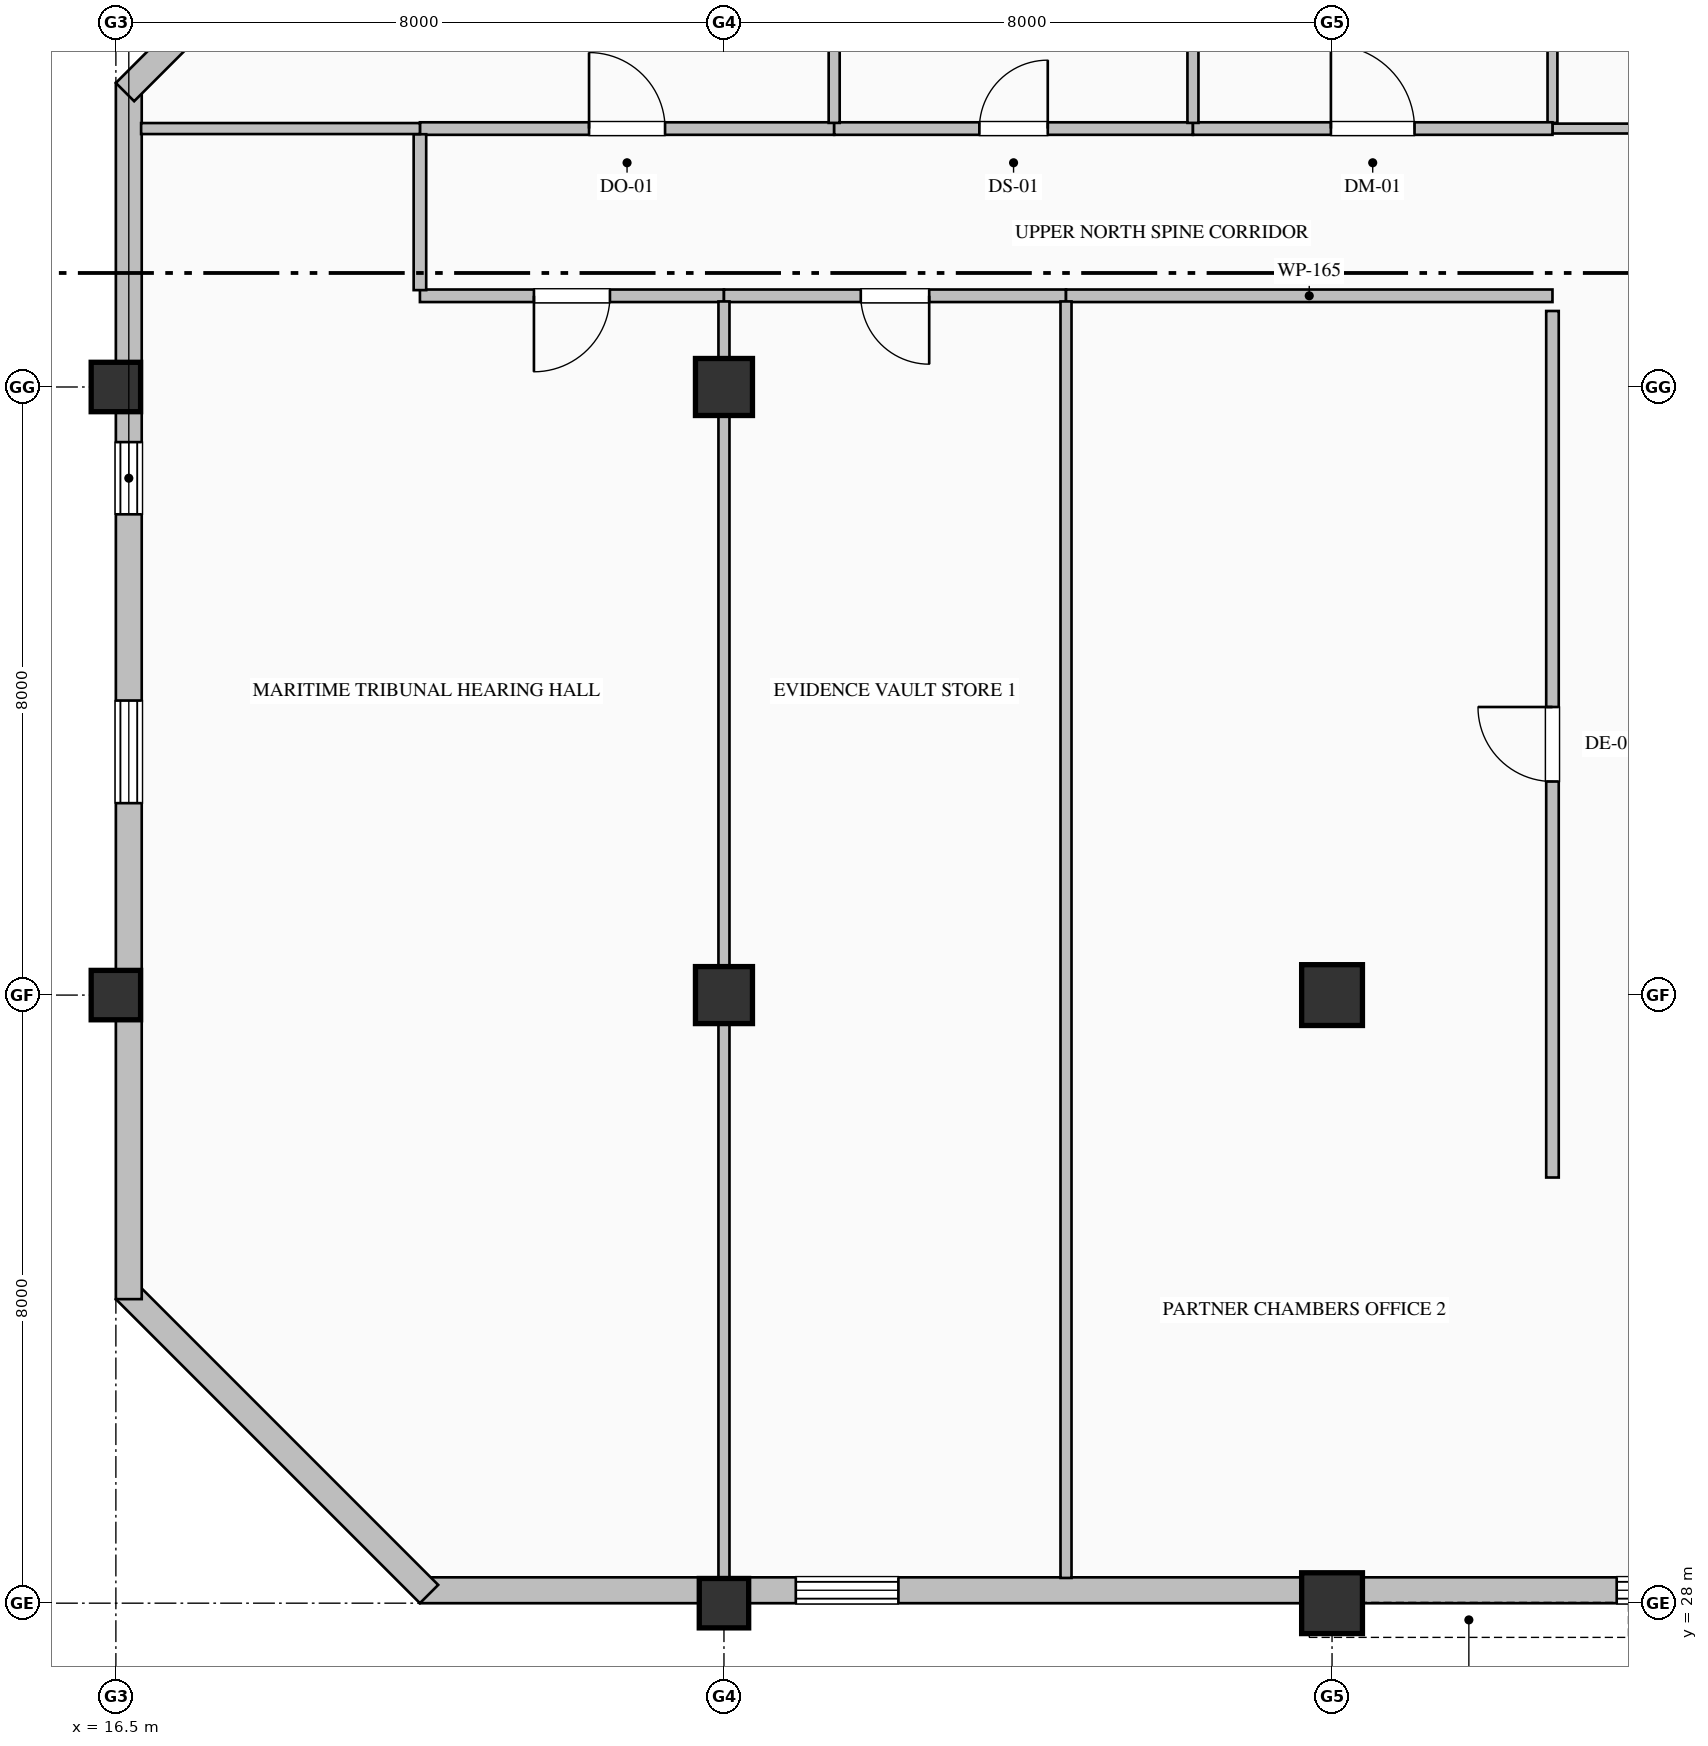
"""IFC4 building model, lengths in metres.
Left out: names, types, materials, properties, quantities, classifications, styles, units other than length and angle.
Written with IfcOpenShell. Run it as: python <this file> out.ifc"""

import sys

from ifc_helpers import new_model, si_unit, direction, frame, frame_2d, origin, origin_2d, place, context, subcontext, project, spatial, rectangle, hollow_rectangle, extrude, element, fill, save


model = new_model("IFC4")
c1 = context("Model", 3, precision=1e-05, world=origin(), true_north=direction((0.0, 1.0)))
c2 = subcontext(c1, "Body", "Model", "MODEL_VIEW")
j1 = project(units=[si_unit("LENGTHUNIT", "METRE"), si_unit("PLANEANGLEUNIT", "RADIAN")], contexts=[c1])
p1 = place(None, origin())
s1 = spatial("IfcSite", under=j1, at=p1, CompositionType="ELEMENT")
p2 = place(p1, origin())
s2 = spatial("IfcBuilding", under=s1, at=p2, CompositionType="ELEMENT")
p3 = place(p2, frame((0.0, 0.0, 363.2)))
s3 = spatial("IfcBuildingStorey", under=s2, at=p3, CompositionType="ELEMENT", Elevation=363.2)
for number, where, z_axis, x_axis in (
    (1, (16.5, 36.0, 0.0), (0.0, 0.0, 1.0), (1.0, 0.0, 0.0)),
    (2, (16.5, 44.0, 0.0), (0.0, 0.0, 1.0), (1.0, 0.0, 0.0)),
    (3, (24.5, 28.0, 0.0), (0.0, 0.0, 1.0), (1.0, 0.0, 0.0)),
):
    element("IfcColumn", number, at=place(p3, frame(where, z_axis=z_axis, x_axis=x_axis)), inside=s3, PredefinedType="COLUMN", context=c2, shape_type="SweptSolid", body=[
        extrude(hollow_rectangle(XDim=0.65, YDim=0.65, WallThickness=0.028, at=origin_2d()), origin(), (0.0, 0.0, 1.0), 4.0),
    ])
for number, where, z_axis, x_axis in (
    (4, (24.5, 36.0, 0.0), (0.0, 0.0, 1.0), (1.0, 0.0, 0.0)),
    (5, (24.5, 44.0, 0.0), (0.0, 0.0, 1.0), (1.0, 0.0, 0.0)),
):
    element("IfcColumn", number, at=place(p3, frame(where, z_axis=z_axis, x_axis=x_axis)), inside=s3, PredefinedType="COLUMN", context=c2, shape_type="SweptSolid", body=[
        extrude(rectangle(XDim=0.75, YDim=0.75, at=origin_2d()), origin(), (0.0, 0.0, 1.0), 4.0),
    ])
for number, where, z_axis, x_axis in (
    (6, (32.5, 28.0, 0.0), (0.0, 0.0, 1.0), (1.0, 0.0, 0.0)),
    (7, (32.5, 36.0, 0.0), (0.0, 0.0, 1.0), (1.0, 0.0, 0.0)),
):
    element("IfcColumn", number, at=place(p3, frame(where, z_axis=z_axis, x_axis=x_axis)), inside=s3, PredefinedType="COLUMN", context=c2, shape_type="SweptSolid", body=[
        extrude(hollow_rectangle(XDim=0.8, YDim=0.8, WallThickness=0.032, at=origin_2d()), origin(), (0.0, 0.0, 1.0), 4.0),
    ])
p4 = place(p3, frame((40.52, 28.17, 0.0), z_axis=(0.0, 0.0, 1.0), x_axis=(-1.0, 0.0, 0.0)))
e8 = element("IfcWall", 8, at=p4, inside=s3, PredefinedType="SOLIDWALL", context=c2, shape_type="SweptSolid", body=[
    extrude(rectangle(XDim=20.02, YDim=0.34, at=frame_2d((10.01, 0.0))), origin(), (0.0, 0.0, 1.0), 2.98),
])
p5 = place(p4, frame((2.925, 0.0, 0.9)))
e9 = element("IfcOpeningElement", 9, at=p5, cuts=e8, PredefinedType="OPENING", context=c2, shape_type="SweptSolid", body=[
    extrude(rectangle(XDim=1.35, YDim=1.85, at=frame_2d((0.675, 0.925))), frame((0.0, 0.18, 0.0), z_axis=(0.0, -1.0, 0.0), x_axis=(1.0, 0.0, 0.0)), (0.0, 0.0, 1.0), 0.36),
])
p6 = place(p4, frame((13.725, 0.0, 0.9)))
e10 = element("IfcOpeningElement", 10, at=p6, cuts=e8, PredefinedType="OPENING", context=c2, shape_type="SweptSolid", body=[
    extrude(rectangle(XDim=1.35, YDim=1.85, at=frame_2d((0.675, 0.925))), frame((0.0, 0.18, 0.0), z_axis=(0.0, -1.0, 0.0), x_axis=(1.0, 0.0, 0.0)), (0.0, 0.0, 1.0), 0.36),
])
p7 = place(p3, frame((20.62, 28.12, 0.0), z_axis=(0.0, 0.0, 1.0), x_axis=(-0.707106781187, 0.707106781187, 0.0)))
e11 = element("IfcWall", 11, at=p7, inside=s3, PredefinedType="SOLIDWALL", context=c2, shape_type="SweptSolid", body=[
    extrude(rectangle(XDim=5.657, YDim=0.34, at=frame_2d((2.828, 0.0))), origin(), (0.0, 0.0, 1.0), 3.58),
])
p8 = place(p3, frame((16.67, 32.0, 0.0), z_axis=(0.0, 0.0, 1.0), x_axis=(0.0, 1.0, 0.0)))
e12 = element("IfcWall", 12, at=p8, inside=s3, PredefinedType="SOLIDWALL", context=c2, shape_type="SweptSolid", body=[
    extrude(rectangle(XDim=16.0, YDim=0.34, at=frame_2d((8.0, 0.0))), origin(), (0.0, 0.0, 1.0), 3.13),
])
p9 = place(p8, frame((6.525, 0.0, 0.9)))
e13 = element("IfcOpeningElement", 13, at=p9, cuts=e12, PredefinedType="OPENING", context=c2, shape_type="SweptSolid", body=[
    extrude(rectangle(XDim=1.35, YDim=1.85, at=frame_2d((0.675, 0.925))), frame((0.0, 0.18, 0.0), z_axis=(0.0, -1.0, 0.0), x_axis=(1.0, 0.0, 0.0)), (0.0, 0.0, 1.0), 0.36),
])
p10 = place(p8, frame((10.325, 0.0, 0.9)))
e14 = element("IfcOpeningElement", 14, at=p10, cuts=e12, PredefinedType="OPENING", context=c2, shape_type="SweptSolid", body=[
    extrude(rectangle(XDim=0.95, YDim=1.85, at=frame_2d((0.475, 0.925))), frame((0.0, 0.18, 0.0), z_axis=(0.0, -1.0, 0.0), x_axis=(1.0, 0.0, 0.0)), (0.0, 0.0, 1.0), 0.36),
])
p11 = place(p3, frame((16.62, 47.88, 0.0), z_axis=(0.0, 0.0, 1.0), x_axis=(0.707106781187, 0.707106781187, 0.0)))
e15 = element("IfcWall", 15, at=p11, inside=s3, PredefinedType="SOLIDWALL", context=c2, shape_type="SweptSolid", body=[
    extrude(rectangle(XDim=5.657, YDim=0.34, at=frame_2d((2.828, 0.0))), origin(), (0.0, 0.0, 1.0), 3.58),
])
p12 = place(p3, frame((37.8, 47.4, 0.0), z_axis=(0.0, 0.0, 1.0), x_axis=(-1.0, 0.0, 0.0)))
e16 = element("IfcWall", 16, at=p12, inside=s3, PredefinedType="PARTITIONING", context=c2, shape_type="SweptSolid", body=[
    extrude(rectangle(XDim=2.4, YDim=0.13, at=frame_2d((1.2, 0.0))), origin(), (0.0, 0.0, 1.0), 3.58),
])
p13 = place(p3, frame((35.4, 47.475, 0.0), z_axis=(0.0, 0.0, 1.0), x_axis=(0.0, 1.0, 0.0)))
e17 = element("IfcWall", 17, at=p13, inside=s3, PredefinedType="PARTITIONING", context=c2, shape_type="SweptSolid", body=[
    extrude(rectangle(XDim=4.193, YDim=0.13, at=frame_2d((2.097, 0.0))), origin(), (0.0, 0.0, 1.0), 3.58),
])
p14 = place(p3, frame((20.5, 47.4, 0.0), z_axis=(0.0, 0.0, 1.0), x_axis=(1.0, 0.0, 0.0)))
e18 = element("IfcWall", 18, at=p14, inside=s3, PredefinedType="PARTITIONING", context=c2, shape_type="SweptSolid", body=[
    extrude(rectangle(XDim=5.45, YDim=0.165, at=frame_2d((2.725, 0.0))), origin(), (0.0, 0.0, 1.0), 3.58),
])
p15 = place(p14, frame((2.225, 0.0, 0.0)))
e19 = element("IfcOpeningElement", 19, at=p15, cuts=e18, PredefinedType="OPENING", context=c2, shape_type="SweptSolid", body=[
    extrude(rectangle(XDim=1.0, YDim=2.15, at=frame_2d((0.5, 1.075))), frame((0.0, 0.093, 0.0), z_axis=(0.0, -1.0, 0.0), x_axis=(1.0, 0.0, 0.0)), (0.0, 0.0, 1.0), 0.185),
])
p16 = place(p3, frame((25.95, 47.4, 0.0), z_axis=(0.0, 0.0, 1.0), x_axis=(1.0, 0.0, 0.0)))
e20 = element("IfcWall", 20, at=p16, inside=s3, PredefinedType="PARTITIONING", context=c2, shape_type="SweptSolid", body=[
    extrude(rectangle(XDim=4.72, YDim=0.165, at=frame_2d((2.36, 0.0))), origin(), (0.0, 0.0, 1.0), 3.58),
])
p17 = place(p16, frame((1.91, 0.0, 0.0)))
e21 = element("IfcOpeningElement", 21, at=p17, cuts=e20, PredefinedType="OPENING", context=c2, shape_type="SweptSolid", body=[
    extrude(rectangle(XDim=0.9, YDim=2.15, at=frame_2d((0.45, 1.075))), frame((0.0, 0.093, 0.0), z_axis=(0.0, -1.0, 0.0), x_axis=(1.0, 0.0, 0.0)), (0.0, 0.0, 1.0), 0.185),
])
p18 = place(p3, frame((30.67, 47.4, 0.0), z_axis=(0.0, 0.0, 1.0), x_axis=(1.0, 0.0, 0.0)))
e22 = element("IfcWall", 22, at=p18, inside=s3, PredefinedType="PARTITIONING", context=c2, shape_type="SweptSolid", body=[
    extrude(rectangle(XDim=4.73, YDim=0.165, at=frame_2d((2.365, 0.0))), origin(), (0.0, 0.0, 1.0), 3.58),
])
p19 = place(p18, frame((1.815, 0.0, 0.0)))
e23 = element("IfcOpeningElement", 23, at=p19, cuts=e22, PredefinedType="OPENING", context=c2, shape_type="SweptSolid", body=[
    extrude(rectangle(XDim=1.1, YDim=2.2, at=frame_2d((0.55, 1.1))), frame((0.0, 0.093, 0.0), z_axis=(0.0, -1.0, 0.0), x_axis=(1.0, 0.0, 0.0)), (0.0, 0.0, 1.0), 0.185),
])
p20 = place(p3, frame((24.5, 45.2, 0.0), z_axis=(0.0, 0.0, 1.0), x_axis=(-1.0, 0.0, 0.0)))
e24 = element("IfcWall", 24, at=p20, inside=s3, PredefinedType="PARTITIONING", context=c2, shape_type="SweptSolid", body=[
    extrude(rectangle(XDim=4.0, YDim=0.165, at=frame_2d((2.0, 0.0))), origin(), (0.0, 0.0, 1.0), 3.58),
])
p21 = place(p20, frame((1.5, 0.0, 0.0)))
e25 = element("IfcOpeningElement", 25, at=p21, cuts=e24, PredefinedType="OPENING", context=c2, shape_type="SweptSolid", body=[
    extrude(rectangle(XDim=1.0, YDim=2.15, at=frame_2d((0.5, 1.075))), frame((0.0, 0.093, 0.0), z_axis=(0.0, -1.0, 0.0), x_axis=(1.0, 0.0, 0.0)), (0.0, 0.0, 1.0), 0.185),
])
p22 = place(p3, frame((20.5, 45.274, 0.0), z_axis=(0.0, 0.0, 1.0), x_axis=(0.0, 1.0, 0.0)))
e26 = element("IfcWall", 26, at=p22, inside=s3, PredefinedType="PARTITIONING", context=c2, shape_type="SweptSolid", body=[
    extrude(rectangle(XDim=2.051, YDim=0.165, at=frame_2d((1.025, 0.0))), origin(), (0.0, 0.0, 1.0), 3.58),
])
p23 = place(p3, frame((29.0, 45.2, 0.0), z_axis=(0.0, 0.0, 1.0), x_axis=(-1.0, 0.0, 0.0)))
e27 = element("IfcWall", 27, at=p23, inside=s3, PredefinedType="PARTITIONING", context=c2, shape_type="SweptSolid", body=[
    extrude(rectangle(XDim=4.5, YDim=0.165, at=frame_2d((2.25, 0.0))), origin(), (0.0, 0.0, 1.0), 3.58),
])
p24 = place(p23, frame((1.8, 0.0, 0.0)))
e28 = element("IfcOpeningElement", 28, at=p24, cuts=e27, PredefinedType="OPENING", context=c2, shape_type="SweptSolid", body=[
    extrude(rectangle(XDim=0.9, YDim=2.15, at=frame_2d((0.45, 1.075))), frame((0.0, 0.093, 0.0), z_axis=(0.0, -1.0, 0.0), x_axis=(1.0, 0.0, 0.0)), (0.0, 0.0, 1.0), 0.185),
])
p25 = place(p3, frame((35.4, 45.2, 0.0), z_axis=(0.0, 0.0, 1.0), x_axis=(-1.0, 0.0, 0.0)))
e29 = element("IfcWall", 29, at=p25, inside=s3, PredefinedType="PARTITIONING", context=c2, shape_type="SweptSolid", body=[
    extrude(rectangle(XDim=6.4, YDim=0.165, at=frame_2d((3.2, 0.0))), origin(), (0.0, 0.0, 1.0), 3.58),
])
p26 = place(p3, frame((35.4, 33.6, 0.0), z_axis=(0.0, 0.0, 1.0), x_axis=(0.0, 1.0, 0.0)))
e30 = element("IfcWall", 30, at=p26, inside=s3, PredefinedType="PARTITIONING", context=c2, shape_type="SweptSolid", body=[
    extrude(rectangle(XDim=11.4, YDim=0.165, at=frame_2d((5.7, 0.0))), origin(), (0.0, 0.0, 1.0), 3.58),
])
p27 = place(p26, frame((5.21, 0.0, 0.0)))
e31 = element("IfcOpeningElement", 31, at=p27, cuts=e30, PredefinedType="OPENING", context=c2, shape_type="SweptSolid", body=[
    extrude(rectangle(XDim=0.98, YDim=2.25, at=frame_2d((0.49, 1.125))), frame((0.0, 0.093, 0.0), z_axis=(0.0, -1.0, 0.0), x_axis=(1.0, 0.0, 0.0)), (0.0, 0.0, 1.0), 0.185),
])
p28 = place(p3, frame((25.95, 51.668, 0.0), z_axis=(0.0, 0.0, 1.0), x_axis=(0.0, -1.0, 0.0)))
e32 = element("IfcWall", 32, at=p28, inside=s3, PredefinedType="PARTITIONING", context=c2, shape_type="SweptSolid", body=[
    extrude(rectangle(XDim=4.193, YDim=0.145, at=frame_2d((2.097, 0.0))), origin(), (0.0, 0.0, 1.0), 3.58),
])
p29 = place(p3, frame((20.5, 47.4, 0.0), z_axis=(0.0, 0.0, 1.0), x_axis=(-1.0, 0.0, 0.0)))
e33 = element("IfcWall", 33, at=p29, inside=s3, PredefinedType="PARTITIONING", context=c2, shape_type="SweptSolid", body=[
    extrude(rectangle(XDim=3.668, YDim=0.145, at=frame_2d((1.834, 0.0))), origin(), (0.0, 0.0, 1.0), 3.58),
])
p30 = place(p3, frame((30.67, 51.668, 0.0), z_axis=(0.0, 0.0, 1.0), x_axis=(0.0, -1.0, 0.0)))
e34 = element("IfcWall", 34, at=p30, inside=s3, PredefinedType="PARTITIONING", context=c2, shape_type="SweptSolid", body=[
    extrude(rectangle(XDim=4.193, YDim=0.145, at=frame_2d((2.097, 0.0))), origin(), (0.0, 0.0, 1.0), 3.58),
])
p31 = place(p3, frame((24.5, 45.125, 0.0), z_axis=(0.0, 0.0, 1.0), x_axis=(0.0, -1.0, 0.0)))
e35 = element("IfcWall", 35, at=p31, inside=s3, PredefinedType="PARTITIONING", context=c2, shape_type="SweptSolid", body=[
    extrude(rectangle(XDim=16.793, YDim=0.145, at=frame_2d((8.397, 0.0))), origin(), (0.0, 0.0, 1.0), 2.972),
])
p32 = place(p3, frame((29.0, 45.125, 0.0), z_axis=(0.0, 0.0, 1.0), x_axis=(0.0, -1.0, 0.0)))
e36 = element("IfcWall", 36, at=p32, inside=s3, PredefinedType="PARTITIONING", context=c2, shape_type="SweptSolid", body=[
    extrude(rectangle(XDim=16.793, YDim=0.145, at=frame_2d((8.397, 0.0))), origin(), (0.0, 0.0, 1.0), 3.58),
])
p33 = place(p5, origin())
e37 = element("IfcWindow", 37, at=p33, inside=s3, PartitioningType="DOUBLE_PANEL_VERTICAL", PredefinedType="WINDOW", context=c2, shape_type="SweptSolid", body=[
    extrude(rectangle(XDim=1.35, YDim=1.85, at=frame_2d((0.675, 0.925))), frame((0.0, 0.15, 0.0), z_axis=(0.0, -1.0, 0.0), x_axis=(1.0, 0.0, 0.0)), (0.0, 0.0, 1.0), 0.06),
])
fill(e9, e37)
p34 = place(p6, origin())
e38 = element("IfcWindow", 38, at=p34, inside=s3, PartitioningType="DOUBLE_PANEL_VERTICAL", PredefinedType="WINDOW", context=c2, shape_type="SweptSolid", body=[
    extrude(rectangle(XDim=1.35, YDim=1.85, at=frame_2d((0.675, 0.925))), frame((0.0, 0.15, 0.0), z_axis=(0.0, -1.0, 0.0), x_axis=(1.0, 0.0, 0.0)), (0.0, 0.0, 1.0), 0.06),
])
fill(e10, e38)
p35 = place(p9, origin())
e39 = element("IfcWindow", 39, at=p35, inside=s3, PartitioningType="DOUBLE_PANEL_VERTICAL", PredefinedType="WINDOW", context=c2, shape_type="SweptSolid", body=[
    extrude(rectangle(XDim=1.35, YDim=1.85, at=frame_2d((0.675, 0.925))), frame((0.0, 0.15, 0.0), z_axis=(0.0, -1.0, 0.0), x_axis=(1.0, 0.0, 0.0)), (0.0, 0.0, 1.0), 0.06),
])
fill(e13, e39)
p36 = place(p10, origin())
e40 = element("IfcWindow", 40, at=p36, inside=s3, PartitioningType="SINGLE_PANEL", PredefinedType="WINDOW", context=c2, shape_type="SweptSolid", body=[
    extrude(rectangle(XDim=0.95, YDim=1.85, at=frame_2d((0.475, 0.925))), frame((0.0, 0.15, 0.0), z_axis=(0.0, -1.0, 0.0), x_axis=(1.0, 0.0, 0.0)), (0.0, 0.0, 1.0), 0.06),
])
fill(e14, e40)
p37 = place(p15, origin())
e41 = element("IfcDoor", 41, at=p37, inside=s3, OperationType="SINGLE_SWING_LEFT", PredefinedType="DOOR", context=c2, shape_type="SweptSolid", body=[
    extrude(rectangle(XDim=1.0, YDim=2.15, at=frame_2d((0.5, 1.075))), frame((0.0, 0.025, 0.0), z_axis=(0.0, -1.0, 0.0), x_axis=(1.0, 0.0, 0.0)), (0.0, 0.0, 1.0), 0.05),
])
fill(e19, e41)
p38 = place(p17, origin())
e42 = element("IfcDoor", 42, at=p38, inside=s3, OperationType="SINGLE_SWING_RIGHT", PredefinedType="DOOR", context=c2, shape_type="SweptSolid", body=[
    extrude(rectangle(XDim=0.9, YDim=2.15, at=frame_2d((0.45, 1.075))), frame((0.0, 0.025, 0.0), z_axis=(0.0, -1.0, 0.0), x_axis=(1.0, 0.0, 0.0)), (0.0, 0.0, 1.0), 0.05),
])
fill(e21, e42)
p39 = place(p19, origin())
e43 = element("IfcDoor", 43, at=p39, inside=s3, OperationType="SINGLE_SWING_LEFT", PredefinedType="DOOR", context=c2, shape_type="SweptSolid", body=[
    extrude(rectangle(XDim=1.1, YDim=2.2, at=frame_2d((0.55, 1.1))), frame((0.0, 0.025, 0.0), z_axis=(0.0, -1.0, 0.0), x_axis=(1.0, 0.0, 0.0)), (0.0, 0.0, 1.0), 0.05),
])
fill(e23, e43)
p40 = place(p21, origin())
e44 = element("IfcDoor", 44, at=p40, inside=s3, OperationType="SINGLE_SWING_RIGHT", PredefinedType="DOOR", context=c2, shape_type="SweptSolid", body=[
    extrude(rectangle(XDim=1.0, YDim=2.15, at=frame_2d((0.5, 1.075))), frame((0.0, 0.025, 0.0), z_axis=(0.0, -1.0, 0.0), x_axis=(1.0, 0.0, 0.0)), (0.0, 0.0, 1.0), 0.05),
])
fill(e25, e44)
p41 = place(p24, origin())
e45 = element("IfcDoor", 45, at=p41, inside=s3, OperationType="SINGLE_SWING_LEFT", PredefinedType="DOOR", context=c2, shape_type="SweptSolid", body=[
    extrude(rectangle(XDim=0.9, YDim=2.15, at=frame_2d((0.45, 1.075))), frame((0.0, 0.025, 0.0), z_axis=(0.0, -1.0, 0.0), x_axis=(1.0, 0.0, 0.0)), (0.0, 0.0, 1.0), 0.05),
])
fill(e28, e45)
p42 = place(p27, origin())
e46 = element("IfcDoor", 46, at=p42, inside=s3, OperationType="SINGLE_SWING_RIGHT", PredefinedType="DOOR", context=c2, shape_type="SweptSolid", body=[
    extrude(rectangle(XDim=0.98, YDim=2.25, at=frame_2d((0.49, 1.125))), frame((0.0, 0.025, 0.0), z_axis=(0.0, -1.0, 0.0), x_axis=(1.0, 0.0, 0.0)), (0.0, 0.0, 1.0), 0.05),
])
fill(e31, e46)
save(model, sys.argv[1])
